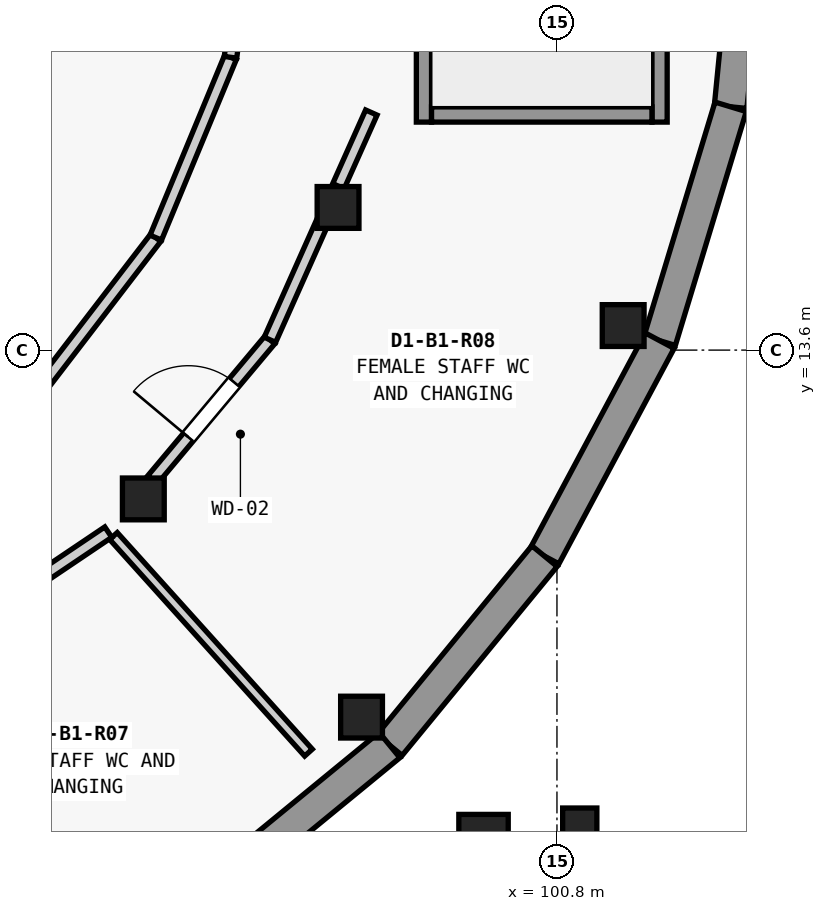
"""IFC4 building model, lengths in metres.
Left out: names, types, materials, properties, quantities, classifications, styles, units other than length and angle.
Written with IfcOpenShell. Run it as: python <this file> out.ifc"""

import sys

from ifc_helpers import new_model, si_unit, direction, frame, frame_2d, origin, origin_2d, place, context, subcontext, project, spatial, rectangle, extrude, element, fill, save


model = new_model("IFC4")
c1 = context("Model", 3, precision=1e-05, world=origin(), true_north=direction((0.0, 1.0)))
c2 = subcontext(c1, "Body", "Model", "MODEL_VIEW")
j1 = project(units=[si_unit("LENGTHUNIT", "METRE"), si_unit("PLANEANGLEUNIT", "RADIAN")], contexts=[c1])
p1 = place(None, origin())
s1 = spatial("IfcSite", under=j1, at=p1, CompositionType="ELEMENT")
p2 = place(p1, origin())
s2 = spatial("IfcBuilding", under=s1, at=p2, CompositionType="ELEMENT")
p3 = place(p2, frame((0.0, 0.0, -4.55)))
s3 = spatial("IfcBuildingStorey", under=s2, at=p3, CompositionType="ELEMENT", Elevation=-4.55)
for number, where, z_axis, x_axis in (
    (1, (98.229, 8.771, 0.0), (0.0, 0.0, 1.0), (1.0, 0.0, 0.0)),
    (2, (101.671, 13.923, 0.0), (0.0, 0.0, 1.0), (1.0, 0.0, 0.0)),
    (3, (95.358, 11.642, 0.0), (0.0, 0.0, 1.0), (1.0, 0.0, 0.0)),
    (4, (97.92, 15.477, 0.0), (0.0, 0.0, 1.0), (1.0, 0.0, 0.0)),
):
    element("IfcColumn", number, at=place(p3, frame(where, z_axis=z_axis, x_axis=x_axis)), inside=s3, PredefinedType="COLUMN", context=c2, shape_type="SweptSolid", body=[
        extrude(rectangle(XDim=0.55, YDim=0.55, at=origin_2d()), origin(), (0.0, 0.0, 1.0), 4.55),
    ])
p4 = place(p3, frame((99.834, 7.166, 0.0), z_axis=(0.0, 0.0, 1.0), x_axis=(1.0, 0.0, 0.0)))
e5 = element("IfcColumn", 5, at=p4, inside=s3, PredefinedType="COLUMN", context=c2, shape_type="SweptSolid", body=[
    extrude(rectangle(XDim=0.65, YDim=0.65, at=origin_2d()), origin(), (0.0, 0.0, 1.0), 4.55),
])
p5 = place(p3, frame((101.1, 7.35, 0.0), z_axis=(0.0, 0.0, 1.0), x_axis=(1.0, 0.0, 0.0)))
e6 = element("IfcColumn", 6, at=p5, inside=s3, PredefinedType="COLUMN", context=c2, shape_type="SweptSolid", body=[
    extrude(rectangle(XDim=0.45, YDim=0.45, at=origin_2d()), origin(), (0.0, 0.0, 1.0), 4.55),
])
p6 = place(p3, frame((103.4, 20.0, 0.0), z_axis=(0.0, 0.0, 1.0), x_axis=(-0.097977057849, -0.995188673637, 0.0)))
e7 = element("IfcWall", 7, at=p6, inside=s3, PredefinedType="USERDEFINED", context=c2, shape_type="SweptSolid", body=[
    extrude(rectangle(XDim=3.214, YDim=0.43, at=frame_2d((1.607, 0.0))), origin(), (0.0, 0.0, 1.0), 3.335),
])
for number, where, z_axis, x_axis in (
    (8, (103.085, 16.801, 0.0), (0.0, 0.0, 1.0), (-0.29, -0.957, 0.0)),
    (9, (102.152, 13.724, 0.0), (0.0, 0.0, 1.0), (-0.472, -0.882, 0.0)),
    (10, (100.636, 10.889, 0.0), (0.0, 0.0, 1.0), (-0.634, -0.773, 0.0)),
    (11, (98.597, 8.403, 0.0), (0.0, 0.0, 1.0), (-0.773, -0.634, 0.0)),
):
    element("IfcWall", number, at=place(p3, frame(where, z_axis=z_axis, x_axis=x_axis)), inside=s3, PredefinedType="USERDEFINED", context=c2, shape_type="SweptSolid", body=[
        extrude(rectangle(XDim=3.215, YDim=0.43, at=frame_2d((1.607, 0.0))), origin(), (0.0, 0.0, 1.0), 3.335),
    ])
p7 = place(p3, frame((99.05, 23.4, 0.0), z_axis=(0.0, 0.0, 1.0), x_axis=(0.0, -1.0, 0.0)))
e12 = element("IfcWall", 12, at=p7, inside=s3, PredefinedType="SHEAR", context=c2, shape_type="SweptSolid", body=[
    extrude(rectangle(XDim=6.8, YDim=0.2, at=frame_2d((3.4, 0.0))), origin(), (0.0, 0.0, 1.0), 4.135),
])
p8 = place(p7, frame((0.38, 0.0, 0.0)))
e13 = element("IfcOpeningElement", 13, at=p8, cuts=e12, PredefinedType="OPENING", context=c2, shape_type="SweptSolid", body=[
    extrude(rectangle(XDim=1.05, YDim=2.15, at=frame_2d((0.525, 1.075))), frame((0.0, 0.11, 0.0), z_axis=(0.0, -1.0, 0.0), x_axis=(1.0, 0.0, 0.0)), (0.0, 0.0, 1.0), 0.22),
])
p9 = place(p3, frame((102.15, 23.4, 0.0), z_axis=(0.0, 0.0, 1.0), x_axis=(0.0, -1.0, 0.0)))
e14 = element("IfcWall", 14, at=p9, inside=s3, PredefinedType="SHEAR", context=c2, shape_type="SweptSolid", body=[
    extrude(rectangle(XDim=6.8, YDim=0.2, at=frame_2d((3.4, 0.0))), origin(), (0.0, 0.0, 1.0), 4.135),
])
p10 = place(p3, frame((99.15, 16.7, 0.0), z_axis=(0.0, 0.0, 1.0), x_axis=(1.0, 0.0, 0.0)))
e15 = element("IfcWall", 15, at=p10, inside=s3, PredefinedType="SHEAR", context=c2, shape_type="SweptSolid", body=[
    extrude(rectangle(XDim=2.9, YDim=0.2, at=frame_2d((1.45, 0.0))), origin(), (0.0, 0.0, 1.0), 4.135),
])
p11 = place(p3, frame((93.958, 13.042, 0.0), z_axis=(0.0, 0.0, 1.0), x_axis=(0.608782621434, 0.793337078322, 0.0)))
e16 = element("IfcWall", 16, at=p11, inside=s3, PredefinedType="PARTITIONING", context=c2, shape_type="SweptSolid", body=[
    extrude(rectangle(XDim=2.569, YDim=0.165, at=frame_2d((1.285, 0.0))), origin(), (0.0, 0.0, 1.0), 2.76),
])
p12 = place(p3, frame((95.522, 15.08, 0.0), z_axis=(0.0, 0.0, 1.0), x_axis=(0.382704397106, 0.923870848353, 0.0)))
e17 = element("IfcWall", 17, at=p12, inside=s3, PredefinedType="PARTITIONING", context=c2, shape_type="SweptSolid", body=[
    extrude(rectangle(XDim=2.568, YDim=0.165, at=frame_2d((1.284, 0.0))), origin(), (0.0, 0.0, 1.0), 2.76),
])
p13 = place(p3, frame((96.505, 17.453, 0.0), z_axis=(0.0, 0.0, 1.0), x_axis=(0.130476636685, 0.991451384224, 0.0)))
e18 = element("IfcWall", 18, at=p13, inside=s3, PredefinedType="PARTITIONING", context=c2, shape_type="SweptSolid", body=[
    extrude(rectangle(XDim=2.569, YDim=0.165, at=frame_2d((1.285, 0.0))), origin(), (0.0, 0.0, 1.0), 2.76),
])
p14 = place(p3, frame((94.965, 11.154, 0.0), z_axis=(0.0, 0.0, 1.0), x_axis=(0.66908430845, -0.74318650969, 0.0)))
e19 = element("IfcWall", 19, at=p14, inside=s3, PredefinedType="PLUMBINGWALL", context=c2, shape_type="SweptSolid", body=[
    extrude(rectangle(XDim=3.835, YDim=0.135, at=frame_2d((1.917, 0.0))), origin(), (0.0, 0.0, 1.0), 2.76),
])
p15 = place(p3, frame((92.182, 9.376, 0.0), z_axis=(0.0, 0.0, 1.0), x_axis=(0.829355825357, 0.558720784423, 0.0)))
e20 = element("IfcWall", 20, at=p15, inside=s3, PredefinedType="PARTITIONING", context=c2, shape_type="SweptSolid", body=[
    extrude(rectangle(XDim=3.274, YDim=0.165, at=frame_2d((1.637, 0.0))), origin(), (0.0, 0.0, 1.0), 2.76),
])
p16 = place(p3, frame((95.48, 11.894, 0.0), z_axis=(0.0, 0.0, 1.0), x_axis=(0.642369860946, 0.766394781916, 0.0)))
e21 = element("IfcWall", 21, at=p16, inside=s3, PredefinedType="PARTITIONING", context=c2, shape_type="SweptSolid", body=[
    extrude(rectangle(XDim=2.404, YDim=0.165, at=frame_2d((1.202, 0.0))), origin(), (0.0, 0.0, 1.0), 2.76),
])
p17 = place(p16, frame((0.732, 0.0, 0.0)))
e22 = element("IfcOpeningElement", 22, at=p17, cuts=e21, PredefinedType="OPENING", context=c2, shape_type="SweptSolid", body=[
    extrude(rectangle(XDim=0.94, YDim=2.1, at=frame_2d((0.47, 1.05))), frame((0.0, 0.093, 0.0), z_axis=(0.0, -1.0, 0.0), x_axis=(1.0, 0.0, 0.0)), (0.0, 0.0, 1.0), 0.185),
])
p18 = place(p3, frame((97.024, 13.736, 0.0), z_axis=(0.0, 0.0, 1.0), x_axis=(0.407299490474, 0.913294654019, 0.0)))
e23 = element("IfcWall", 23, at=p18, inside=s3, PredefinedType="PARTITIONING", context=c2, shape_type="SweptSolid", body=[
    extrude(rectangle(XDim=1.697, YDim=0.165, at=frame_2d((0.849, 0.0))), origin(), (0.0, 0.0, 1.0), 2.76),
])
p19 = place(p3, frame((97.925, 15.757, 0.0), z_axis=(0.0, 0.0, 1.0), x_axis=(0.407866620659, 0.913041521374, 0.0)))
e24 = element("IfcWall", 24, at=p19, inside=s3, PredefinedType="PARTITIONING", context=c2, shape_type="SweptSolid", body=[
    extrude(rectangle(XDim=1.061, YDim=0.165, at=frame_2d((0.531, 0.0))), origin(), (0.0, 0.0, 1.0), 2.76),
])
p20 = place(p17, origin())
e25 = element("IfcDoor", 25, at=p20, inside=s3, OperationType="SINGLE_SWING_LEFT", PredefinedType="DOOR", context=c2, shape_type="SweptSolid", body=[
    extrude(rectangle(XDim=0.94, YDim=2.1, at=frame_2d((0.47, 1.05))), frame((0.0, 0.025, 0.0), z_axis=(0.0, -1.0, 0.0), x_axis=(1.0, 0.0, 0.0)), (0.0, 0.0, 1.0), 0.05),
])
fill(e22, e25)
save(model, sys.argv[1])
